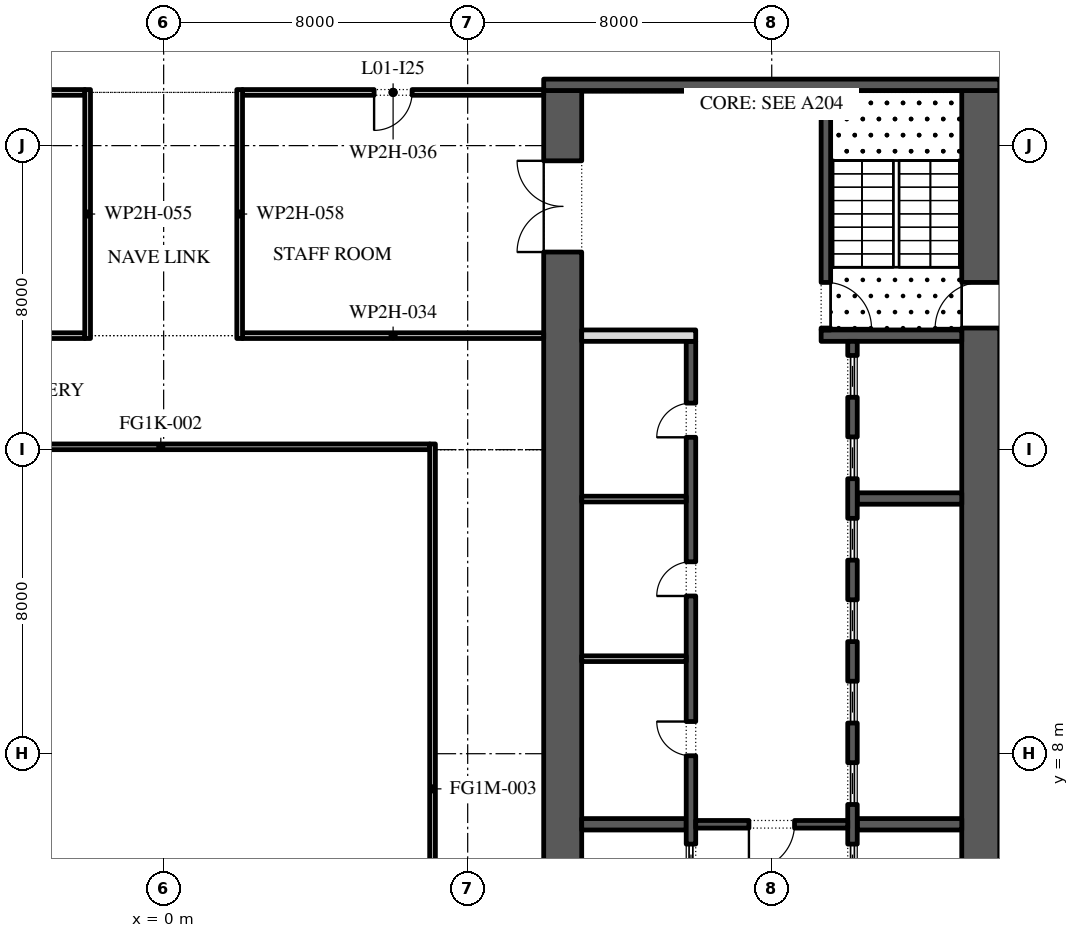
"""IFC4 building model, lengths in metres.
Left out: names, types, materials, properties, quantities, classifications, styles, units other than length and angle.
Written with IfcOpenShell. Run it as: python <this file> out.ifc"""

import sys

from ifc_helpers import new_model, si_unit, direction, frame, frame_2d, origin, place, context, subcontext, project, spatial, rectangle, extrude, element, fill, save


model = new_model("IFC4")
c1 = context("Model", 3, precision=1e-05, world=origin(), true_north=direction((0.0, 1.0)))
c2 = subcontext(c1, "Body", "Model", "MODEL_VIEW")
j1 = project(units=[si_unit("LENGTHUNIT", "METRE"), si_unit("PLANEANGLEUNIT", "RADIAN")], contexts=[c1])
p1 = place(None, origin())
s1 = spatial("IfcSite", under=j1, at=p1, CompositionType="ELEMENT")
p2 = place(p1, origin())
s2 = spatial("IfcBuilding", under=s1, at=p2, CompositionType="ELEMENT")
p3 = place(p2, frame((0.0, 0.0, 8.0)))
s3 = spatial("IfcBuildingStorey", under=s2, at=p3, CompositionType="ELEMENT", Elevation=8.0)
p4 = place(p3, frame((-7.15, 16.075, 0.0), z_axis=(0.0, 0.0, 1.0), x_axis=(1.0, 0.0, 0.0)))
e1 = element("IfcWall", 1, at=p4, inside=s3, PredefinedType="STANDARD", context=c2, shape_type="SweptSolid", body=[
    extrude(rectangle(XDim=14.15, YDim=0.15, at=frame_2d((7.075, 0.0))), origin(), (0.0, 0.0, 1.0), 4.72),
])
p5 = place(p3, frame((7.075, 16.15, 0.0), z_axis=(0.0, 0.0, 1.0), x_axis=(0.0, -1.0, 0.0)))
e2 = element("IfcWall", 2, at=p5, inside=s3, PredefinedType="STANDARD", context=c2, shape_type="SweptSolid", body=[
    extrude(rectangle(XDim=18.15, YDim=0.15, at=frame_2d((9.075, 0.0))), origin(), (0.0, 0.0, 1.0), 5.7),
])
p6 = place(p3, frame((21.5, -2.45, 0.0), z_axis=(0.0, 0.0, 1.0), x_axis=(0.0, 1.0, 0.0)))
e3 = element("IfcWall", 3, at=p6, inside=s3, PredefinedType="SHEAR", context=c2, shape_type="SweptSolid", body=[
    extrude(rectangle(XDim=27.9, YDim=1.0, at=frame_2d((13.95, 0.0))), origin(), (0.0, 0.0, 1.0), 5.7),
])
p7 = place(p6, frame((5.05, 0.0, 0.0)))
e4 = element("IfcOpeningElement", 4, at=p7, cuts=e3, PredefinedType="OPENING", context=c2, shape_type="SweptSolid", body=[
    extrude(rectangle(XDim=1.2, YDim=2.1, at=frame_2d((0.6, 1.05))), frame((0.0, 0.51, 0.0), z_axis=(0.0, -1.0, 0.0), x_axis=(1.0, 0.0, 0.0)), (0.0, 0.0, 1.0), 1.02),
])
p8 = place(p6, frame((21.65, 0.0, 0.0)))
e5 = element("IfcOpeningElement", 5, at=p8, cuts=e3, PredefinedType="OPENING", context=c2, shape_type="SweptSolid", body=[
    extrude(rectangle(XDim=1.2, YDim=2.1, at=frame_2d((0.6, 1.05))), frame((0.0, 0.51, 0.0), z_axis=(0.0, -1.0, 0.0), x_axis=(1.0, 0.0, 0.0)), (0.0, 0.0, 1.0), 1.02),
])
p9 = place(p3, frame((10.5, -2.45, 0.0), z_axis=(0.0, 0.0, 1.0), x_axis=(0.0, 1.0, 0.0)))
e6 = element("IfcWall", 6, at=p9, inside=s3, PredefinedType="SHEAR", context=c2, shape_type="SweptSolid", body=[
    extrude(rectangle(XDim=27.9, YDim=1.0, at=frame_2d((13.95, 0.0))), origin(), (0.0, 0.0, 1.0), 5.7),
])
p10 = place(p9, frame((23.65, 0.0, 0.0)))
e7 = element("IfcOpeningElement", 7, at=p10, cuts=e6, PredefinedType="OPENING", context=c2, shape_type="SweptSolid", body=[
    extrude(rectangle(XDim=2.4, YDim=2.1, at=frame_2d((1.2, 1.05))), frame((0.0, 0.51, 0.0), z_axis=(0.0, -1.0, 0.0), x_axis=(1.0, 0.0, 0.0)), (0.0, 0.0, 1.0), 1.02),
])
p11 = place(p9, frame((0.788, 0.0, 0.0)))
e8 = element("IfcOpeningElement", 8, at=p11, cuts=e6, PredefinedType="OPENING", context=c2, shape_type="SweptSolid", body=[
    extrude(rectangle(XDim=0.9, YDim=2.1, at=frame_2d((0.45, 1.05))), frame((0.0, 0.51, 0.0), z_axis=(0.0, -1.0, 0.0), x_axis=(1.0, 0.0, 0.0)), (0.0, 0.0, 1.0), 1.02),
])
p12 = place(p9, frame((4.012, 0.0, 0.0)))
e9 = element("IfcOpeningElement", 9, at=p12, cuts=e6, PredefinedType="OPENING", context=c2, shape_type="SweptSolid", body=[
    extrude(rectangle(XDim=0.9, YDim=2.1, at=frame_2d((0.45, 1.05))), frame((0.0, 0.51, 0.0), z_axis=(0.0, -1.0, 0.0), x_axis=(1.0, 0.0, 0.0)), (0.0, 0.0, 1.0), 1.02),
])
p13 = place(p3, frame((10.0, 25.6, 0.0), z_axis=(0.0, 0.0, 1.0), x_axis=(1.0, 0.0, 0.0)))
e10 = element("IfcWall", 10, at=p13, inside=s3, PredefinedType="SHEAR", context=c2, shape_type="SweptSolid", body=[
    extrude(rectangle(XDim=12.0, YDim=0.3, at=frame_2d((6.0, 0.0))), origin(), (0.0, 0.0, 1.0), 5.7),
])
p14 = place(p3, frame((17.3, 19.0, 0.0), z_axis=(0.0, 0.0, 1.0), x_axis=(1.0, 0.0, 0.0)))
e11 = element("IfcWall", 11, at=p14, inside=s3, PredefinedType="SHEAR", context=c2, shape_type="SweptSolid", body=[
    extrude(rectangle(XDim=3.7, YDim=0.3, at=frame_2d((1.85, 0.0))), origin(), (0.0, 0.0, 1.0), 5.7),
])
p15 = place(p3, frame((17.425, 19.15, 0.0), z_axis=(0.0, 0.0, 1.0), x_axis=(0.0, 1.0, 0.0)))
e12 = element("IfcWall", 12, at=p15, inside=s3, PredefinedType="SHEAR", context=c2, shape_type="SweptSolid", body=[
    extrude(rectangle(XDim=6.3, YDim=0.25, at=frame_2d((3.15, 0.0))), origin(), (0.0, 0.0, 1.0), 5.7),
])
p16 = place(p15, frame((0.05, 0.0, 0.0)))
e13 = element("IfcOpeningElement", 13, at=p16, cuts=e12, PredefinedType="OPENING", context=c2, shape_type="SweptSolid", body=[
    extrude(rectangle(XDim=1.2, YDim=2.1, at=frame_2d((0.6, 1.05))), frame((0.0, 0.135, 0.0), z_axis=(0.0, -1.0, 0.0), x_axis=(1.0, 0.0, 0.0)), (0.0, 0.0, 1.0), 0.27),
])
for number, where, z_axis, x_axis in (
    (14, (18.25, 6.143, 0.0), (0.0, 0.0, 1.0), (1.0, 0.0, 0.0)),
    (15, (18.25, 14.714, 0.0), (0.0, 0.0, 1.0), (1.0, 0.0, 0.0)),
):
    element("IfcWall", number, at=place(p3, frame(where, z_axis=z_axis, x_axis=x_axis)), inside=s3, PredefinedType="SHEAR", context=c2, shape_type="SweptSolid", body=[
        extrude(rectangle(XDim=2.75, YDim=0.3, at=frame_2d((1.375, 0.0))), origin(), (0.0, 0.0, 1.0), 5.7),
    ])
p17 = place(p3, frame((18.125, 4.15, 0.0), z_axis=(0.0, 0.0, 1.0), x_axis=(0.0, 1.0, 0.0)))
e16 = element("IfcWall", 16, at=p17, inside=s3, PredefinedType="SHEAR", context=c2, shape_type="SweptSolid", body=[
    extrude(rectangle(XDim=14.7, YDim=0.25, at=frame_2d((7.35, 0.0))), origin(), (0.0, 0.0, 1.0), 5.7),
])
p18 = place(p17, frame((0.371, 0.0, 0.0)))
e17 = element("IfcOpeningElement", 17, at=p18, cuts=e16, PredefinedType="OPENING", context=c2, shape_type="SweptSolid", body=[
    extrude(rectangle(XDim=1.1, YDim=2.1, at=frame_2d((0.55, 1.05))), frame((0.0, 0.135, 0.0), z_axis=(0.0, -1.0, 0.0), x_axis=(1.0, 0.0, 0.0)), (0.0, 0.0, 1.0), 0.27),
])
p19 = place(p17, frame((2.514, 0.0, 0.0)))
e18 = element("IfcOpeningElement", 18, at=p19, cuts=e16, PredefinedType="OPENING", context=c2, shape_type="SweptSolid", body=[
    extrude(rectangle(XDim=1.1, YDim=2.1, at=frame_2d((0.55, 1.05))), frame((0.0, 0.135, 0.0), z_axis=(0.0, -1.0, 0.0), x_axis=(1.0, 0.0, 0.0)), (0.0, 0.0, 1.0), 0.27),
])
p20 = place(p17, frame((4.657, 0.0, 0.0)))
e19 = element("IfcOpeningElement", 19, at=p20, cuts=e16, PredefinedType="OPENING", context=c2, shape_type="SweptSolid", body=[
    extrude(rectangle(XDim=1.1, YDim=2.1, at=frame_2d((0.55, 1.05))), frame((0.0, 0.135, 0.0), z_axis=(0.0, -1.0, 0.0), x_axis=(1.0, 0.0, 0.0)), (0.0, 0.0, 1.0), 0.27),
])
p21 = place(p17, frame((6.8, 0.0, 0.0)))
e20 = element("IfcOpeningElement", 20, at=p21, cuts=e16, PredefinedType="OPENING", context=c2, shape_type="SweptSolid", body=[
    extrude(rectangle(XDim=1.1, YDim=2.1, at=frame_2d((0.55, 1.05))), frame((0.0, 0.135, 0.0), z_axis=(0.0, -1.0, 0.0), x_axis=(1.0, 0.0, 0.0)), (0.0, 0.0, 1.0), 0.27),
])
p22 = place(p17, frame((8.943, 0.0, 0.0)))
e21 = element("IfcOpeningElement", 21, at=p22, cuts=e16, PredefinedType="OPENING", context=c2, shape_type="SweptSolid", body=[
    extrude(rectangle(XDim=1.1, YDim=2.1, at=frame_2d((0.55, 1.05))), frame((0.0, 0.135, 0.0), z_axis=(0.0, -1.0, 0.0), x_axis=(1.0, 0.0, 0.0)), (0.0, 0.0, 1.0), 0.27),
])
p23 = place(p17, frame((11.086, 0.0, 0.0)))
e22 = element("IfcOpeningElement", 22, at=p23, cuts=e16, PredefinedType="OPENING", context=c2, shape_type="SweptSolid", body=[
    extrude(rectangle(XDim=1.1, YDim=2.1, at=frame_2d((0.55, 1.05))), frame((0.0, 0.135, 0.0), z_axis=(0.0, -1.0, 0.0), x_axis=(1.0, 0.0, 0.0)), (0.0, 0.0, 1.0), 0.27),
])
p24 = place(p17, frame((13.229, 0.0, 0.0)))
e23 = element("IfcOpeningElement", 23, at=p24, cuts=e16, PredefinedType="OPENING", context=c2, shape_type="SweptSolid", body=[
    extrude(rectangle(XDim=1.1, YDim=2.1, at=frame_2d((0.55, 1.05))), frame((0.0, 0.135, 0.0), z_axis=(0.0, -1.0, 0.0), x_axis=(1.0, 0.0, 0.0)), (0.0, 0.0, 1.0), 0.27),
])
p25 = place(p3, frame((11.0, 6.143, 0.0), z_axis=(0.0, 0.0, 1.0), x_axis=(1.0, 0.0, 0.0)))
e24 = element("IfcWall", 24, at=p25, inside=s3, PredefinedType="SHEAR", context=c2, shape_type="SweptSolid", body=[
    extrude(rectangle(XDim=2.75, YDim=0.3, at=frame_2d((1.375, 0.0))), origin(), (0.0, 0.0, 1.0), 5.7),
])
p26 = place(p3, frame((13.875, -2.45, 0.0), z_axis=(0.0, 0.0, 1.0), x_axis=(0.0, 1.0, 0.0)))
e25 = element("IfcWall", 25, at=p26, inside=s3, PredefinedType="SHEAR", context=c2, shape_type="SweptSolid", body=[
    extrude(rectangle(XDim=21.3, YDim=0.25, at=frame_2d((10.65, 0.0))), origin(), (0.0, 0.0, 1.0), 5.7),
])
p27 = place(p26, frame((10.396, 0.0, 0.0)))
e26 = element("IfcOpeningElement", 26, at=p27, cuts=e25, PredefinedType="OPENING", context=c2, shape_type="SweptSolid", body=[
    extrude(rectangle(XDim=0.9, YDim=2.1, at=frame_2d((0.45, 1.05))), frame((0.0, 0.135, 0.0), z_axis=(0.0, -1.0, 0.0), x_axis=(1.0, 0.0, 0.0)), (0.0, 0.0, 1.0), 0.27),
])
p28 = place(p26, frame((14.6, 0.0, 0.0)))
e27 = element("IfcOpeningElement", 27, at=p28, cuts=e25, PredefinedType="OPENING", context=c2, shape_type="SweptSolid", body=[
    extrude(rectangle(XDim=0.9, YDim=2.1, at=frame_2d((0.45, 1.05))), frame((0.0, 0.135, 0.0), z_axis=(0.0, -1.0, 0.0), x_axis=(1.0, 0.0, 0.0)), (0.0, 0.0, 1.0), 0.27),
])
p29 = place(p26, frame((18.775, 0.0, 0.0)))
e28 = element("IfcOpeningElement", 28, at=p29, cuts=e25, PredefinedType="OPENING", context=c2, shape_type="SweptSolid", body=[
    extrude(rectangle(XDim=0.9, YDim=2.1, at=frame_2d((0.45, 1.05))), frame((0.0, 0.135, 0.0), z_axis=(0.0, -1.0, 0.0), x_axis=(1.0, 0.0, 0.0)), (0.0, 0.0, 1.0), 0.27),
])
p30 = place(p26, frame((6.971, 0.0, 0.0)))
e29 = element("IfcOpeningElement", 29, at=p30, cuts=e25, PredefinedType="OPENING", context=c2, shape_type="SweptSolid", body=[
    extrude(rectangle(XDim=1.1, YDim=2.1, at=frame_2d((0.55, 1.05))), frame((0.0, 0.135, 0.0), z_axis=(0.0, -1.0, 0.0), x_axis=(1.0, 0.0, 0.0)), (0.0, 0.0, 1.0), 0.27),
])
p31 = place(p3, frame((11.0, 19.0, 0.0), z_axis=(0.0, 0.0, 1.0), x_axis=(1.0, 0.0, 0.0)))
e30 = element("IfcWall", 30, at=p31, inside=s3, PredefinedType="PARTITIONING", context=c2, shape_type="SweptSolid", body=[
    extrude(rectangle(XDim=3.0, YDim=0.3, at=frame_2d((1.5, 0.0))), origin(), (0.0, 0.0, 1.0), 5.7),
])
for number, where, z_axis, x_axis in (
    (31, (11.0, 10.5, 0.0), (0.0, 0.0, 1.0), (1.0, 0.0, 0.0)),
    (32, (11.0, 14.7, 0.0), (0.0, 0.0, 1.0), (1.0, 0.0, 0.0)),
):
    element("IfcWall", number, at=place(p3, frame(where, z_axis=z_axis, x_axis=x_axis)), inside=s3, PredefinedType="PARTITIONING", context=c2, shape_type="SweptSolid", body=[
        extrude(rectangle(XDim=2.75, YDim=0.15, at=frame_2d((1.375, 0.0))), origin(), (0.0, 0.0, 1.0), 5.7),
    ])
p32 = place(p3, frame((14.0, 6.143, 0.0), z_axis=(0.0, 0.0, 1.0), x_axis=(1.0, 0.0, 0.0)))
e33 = element("IfcWall", 33, at=p32, inside=s3, PredefinedType="SHEAR", context=c2, shape_type="SweptSolid", body=[
    extrude(rectangle(XDim=4.0, YDim=0.2, at=frame_2d((2.0, 0.0))), origin(), (0.0, 0.0, 1.0), 5.7),
])
p33 = place(p32, frame((1.4, 0.0, 0.0)))
e34 = element("IfcOpeningElement", 34, at=p33, cuts=e33, PredefinedType="OPENING", context=c2, shape_type="SweptSolid", body=[
    extrude(rectangle(XDim=1.2, YDim=2.1, at=frame_2d((0.6, 1.05))), frame((0.0, 0.11, 0.0), z_axis=(0.0, -1.0, 0.0), x_axis=(1.0, 0.0, 0.0)), (0.0, 0.0, 1.0), 0.22),
])
for number, where, z_axis, x_axis in (
    (35, (-10.0, 19.0, 0.0), (0.0, 0.0, 1.0), (1.0, 0.0, 0.0)),
    (36, (2.075, 19.0, 0.0), (0.0, 0.0, 1.0), (1.0, 0.0, 0.0)),
):
    element("IfcWall", number, at=place(p3, frame(where, z_axis=z_axis, x_axis=x_axis)), inside=s3, PredefinedType="PARTITIONING", context=c2, shape_type="SweptSolid", body=[
        extrude(rectangle(XDim=7.925, YDim=0.15, at=frame_2d((3.962, 0.0))), origin(), (0.0, 0.0, 1.0), 5.7),
    ])
p34 = place(p3, frame((-10.0, 25.4, 0.0), z_axis=(0.0, 0.0, 1.0), x_axis=(1.0, 0.0, 0.0)))
e37 = element("IfcWall", 37, at=p34, inside=s3, PredefinedType="PARTITIONING", context=c2, shape_type="SweptSolid", body=[
    extrude(rectangle(XDim=7.925, YDim=0.15, at=frame_2d((3.962, 0.0))), origin(), (0.0, 0.0, 1.0), 5.7),
])
p35 = place(p34, frame((3.462, 0.0, 0.0)))
e38 = element("IfcOpeningElement", 38, at=p35, cuts=e37, PredefinedType="OPENING", context=c2, shape_type="SweptSolid", body=[
    extrude(rectangle(XDim=1.0, YDim=2.1, at=frame_2d((0.5, 1.05))), frame((0.0, 0.085, 0.0), z_axis=(0.0, -1.0, 0.0), x_axis=(1.0, 0.0, 0.0)), (0.0, 0.0, 1.0), 0.17),
])
p36 = place(p3, frame((2.075, 25.4, 0.0), z_axis=(0.0, 0.0, 1.0), x_axis=(1.0, 0.0, 0.0)))
e39 = element("IfcWall", 39, at=p36, inside=s3, PredefinedType="PARTITIONING", context=c2, shape_type="SweptSolid", body=[
    extrude(rectangle(XDim=7.925, YDim=0.15, at=frame_2d((3.962, 0.0))), origin(), (0.0, 0.0, 1.0), 5.7),
])
p37 = place(p36, frame((3.462, 0.0, 0.0)))
e40 = element("IfcOpeningElement", 40, at=p37, cuts=e39, PredefinedType="OPENING", context=c2, shape_type="SweptSolid", body=[
    extrude(rectangle(XDim=1.0, YDim=2.1, at=frame_2d((0.5, 1.05))), frame((0.0, 0.085, 0.0), z_axis=(0.0, -1.0, 0.0), x_axis=(1.0, 0.0, 0.0)), (0.0, 0.0, 1.0), 0.17),
])
for number, where, z_axis, x_axis in (
    (41, (-2.0, 18.925, 0.0), (0.0, 0.0, 1.0), (0.0, 1.0, 0.0)),
    (42, (2.0, 18.925, 0.0), (0.0, 0.0, 1.0), (0.0, 1.0, 0.0)),
):
    element("IfcWall", number, at=place(p3, frame(where, z_axis=z_axis, x_axis=x_axis)), inside=s3, PredefinedType="PARTITIONING", context=c2, shape_type="SweptSolid", body=[
        extrude(rectangle(XDim=6.55, YDim=0.15, at=frame_2d((3.275, 0.0))), origin(), (0.0, 0.0, 1.0), 5.7),
    ])
p38 = place(p18, origin())
e43 = element("IfcDoor", 43, at=p38, inside=s3, OperationType="SLIDING_TO_LEFT", PredefinedType="DOOR", context=c2, shape_type="SweptSolid", body=[
    extrude(rectangle(XDim=1.1, YDim=2.1, at=frame_2d((0.55, 1.05))), frame((0.0, 0.025, 0.0), z_axis=(0.0, -1.0, 0.0), x_axis=(1.0, 0.0, 0.0)), (0.0, 0.0, 1.0), 0.05),
])
fill(e17, e43)
p39 = place(p19, origin())
e44 = element("IfcDoor", 44, at=p39, inside=s3, OperationType="SLIDING_TO_LEFT", PredefinedType="DOOR", context=c2, shape_type="SweptSolid", body=[
    extrude(rectangle(XDim=1.1, YDim=2.1, at=frame_2d((0.55, 1.05))), frame((0.0, 0.025, 0.0), z_axis=(0.0, -1.0, 0.0), x_axis=(1.0, 0.0, 0.0)), (0.0, 0.0, 1.0), 0.05),
])
fill(e18, e44)
p40 = place(p20, origin())
e45 = element("IfcDoor", 45, at=p40, inside=s3, OperationType="SLIDING_TO_LEFT", PredefinedType="DOOR", context=c2, shape_type="SweptSolid", body=[
    extrude(rectangle(XDim=1.1, YDim=2.1, at=frame_2d((0.55, 1.05))), frame((0.0, 0.025, 0.0), z_axis=(0.0, -1.0, 0.0), x_axis=(1.0, 0.0, 0.0)), (0.0, 0.0, 1.0), 0.05),
])
fill(e19, e45)
p41 = place(p21, origin())
e46 = element("IfcDoor", 46, at=p41, inside=s3, OperationType="SLIDING_TO_LEFT", PredefinedType="DOOR", context=c2, shape_type="SweptSolid", body=[
    extrude(rectangle(XDim=1.1, YDim=2.1, at=frame_2d((0.55, 1.05))), frame((0.0, 0.025, 0.0), z_axis=(0.0, -1.0, 0.0), x_axis=(1.0, 0.0, 0.0)), (0.0, 0.0, 1.0), 0.05),
])
fill(e20, e46)
p42 = place(p22, origin())
e47 = element("IfcDoor", 47, at=p42, inside=s3, OperationType="SLIDING_TO_LEFT", PredefinedType="DOOR", context=c2, shape_type="SweptSolid", body=[
    extrude(rectangle(XDim=1.1, YDim=2.1, at=frame_2d((0.55, 1.05))), frame((0.0, 0.025, 0.0), z_axis=(0.0, -1.0, 0.0), x_axis=(1.0, 0.0, 0.0)), (0.0, 0.0, 1.0), 0.05),
])
fill(e21, e47)
p43 = place(p23, origin())
e48 = element("IfcDoor", 48, at=p43, inside=s3, OperationType="SLIDING_TO_LEFT", PredefinedType="DOOR", context=c2, shape_type="SweptSolid", body=[
    extrude(rectangle(XDim=1.1, YDim=2.1, at=frame_2d((0.55, 1.05))), frame((0.0, 0.025, 0.0), z_axis=(0.0, -1.0, 0.0), x_axis=(1.0, 0.0, 0.0)), (0.0, 0.0, 1.0), 0.05),
])
fill(e22, e48)
p44 = place(p24, origin())
e49 = element("IfcDoor", 49, at=p44, inside=s3, OperationType="SLIDING_TO_LEFT", PredefinedType="DOOR", context=c2, shape_type="SweptSolid", body=[
    extrude(rectangle(XDim=1.1, YDim=2.1, at=frame_2d((0.55, 1.05))), frame((0.0, 0.025, 0.0), z_axis=(0.0, -1.0, 0.0), x_axis=(1.0, 0.0, 0.0)), (0.0, 0.0, 1.0), 0.05),
])
fill(e23, e49)
p45 = place(p27, origin())
e50 = element("IfcDoor", 50, at=p45, inside=s3, OperationType="SINGLE_SWING_LEFT", PredefinedType="DOOR", context=c2, shape_type="SweptSolid", body=[
    extrude(rectangle(XDim=0.9, YDim=2.1, at=frame_2d((0.45, 1.05))), frame((0.0, 0.125, 0.0), z_axis=(0.0, -1.0, 0.0), x_axis=(1.0, 0.0, 0.0)), (0.0, 0.0, 1.0), 0.05),
])
fill(e26, e50)
p46 = place(p28, origin())
e51 = element("IfcDoor", 51, at=p46, inside=s3, OperationType="SINGLE_SWING_RIGHT", PredefinedType="DOOR", context=c2, shape_type="SweptSolid", body=[
    extrude(rectangle(XDim=0.9, YDim=2.1, at=frame_2d((0.45, 1.05))), frame((0.0, 0.125, 0.0), z_axis=(0.0, -1.0, 0.0), x_axis=(1.0, 0.0, 0.0)), (0.0, 0.0, 1.0), 0.05),
])
fill(e27, e51)
p47 = place(p29, origin())
e52 = element("IfcDoor", 52, at=p47, inside=s3, OperationType="SINGLE_SWING_RIGHT", PredefinedType="DOOR", context=c2, shape_type="SweptSolid", body=[
    extrude(rectangle(XDim=0.9, YDim=2.1, at=frame_2d((0.45, 1.05))), frame((0.0, 0.125, 0.0), z_axis=(0.0, -1.0, 0.0), x_axis=(1.0, 0.0, 0.0)), (0.0, 0.0, 1.0), 0.05),
])
fill(e28, e52)
p48 = place(p30, origin())
e53 = element("IfcDoor", 53, at=p48, inside=s3, OperationType="SLIDING_TO_LEFT", PredefinedType="DOOR", context=c2, shape_type="SweptSolid", body=[
    extrude(rectangle(XDim=1.1, YDim=2.1, at=frame_2d((0.55, 1.05))), frame((0.0, 0.025, 0.0), z_axis=(0.0, -1.0, 0.0), x_axis=(1.0, 0.0, 0.0)), (0.0, 0.0, 1.0), 0.05),
])
fill(e29, e53)
p49 = place(p33, frame((1.2, 0.0, 0.0), z_axis=(0.0, 0.0, 1.0), x_axis=(-1.0, 0.0, 0.0)))
e54 = element("IfcDoor", 54, at=p49, inside=s3, OperationType="SINGLE_SWING_LEFT", PredefinedType="DOOR", context=c2, shape_type="SweptSolid", body=[
    extrude(rectangle(XDim=1.2, YDim=2.1, at=frame_2d((0.6, 1.05))), frame((0.0, 0.025, 0.0), z_axis=(0.0, -1.0, 0.0), x_axis=(1.0, 0.0, 0.0)), (0.0, 0.0, 1.0), 0.05),
])
fill(e34, e54)
p50 = place(p10, origin())
e55 = element("IfcDoor", 55, at=p50, inside=s3, OperationType="DOUBLE_DOOR_SINGLE_SWING", PredefinedType="DOOR", context=c2, shape_type="SweptSolid", body=[
    extrude(rectangle(XDim=2.4, YDim=2.1, at=frame_2d((1.2, 1.05))), frame((0.0, 0.025, 0.0), z_axis=(0.0, -1.0, 0.0), x_axis=(1.0, 0.0, 0.0)), (0.0, 0.0, 1.0), 0.05),
])
fill(e7, e55)
p51 = place(p16, frame((1.2, 0.0, 0.0), z_axis=(0.0, 0.0, 1.0), x_axis=(-1.0, 0.0, 0.0)))
e56 = element("IfcDoor", 56, at=p51, inside=s3, OperationType="SINGLE_SWING_LEFT", PredefinedType="DOOR", context=c2, shape_type="SweptSolid", body=[
    extrude(rectangle(XDim=1.2, YDim=2.1, at=frame_2d((0.6, 1.05))), frame((0.0, 0.025, 0.0), z_axis=(0.0, -1.0, 0.0), x_axis=(1.0, 0.0, 0.0)), (0.0, 0.0, 1.0), 0.05),
])
fill(e13, e56)
p52 = place(p8, origin())
e57 = element("IfcDoor", 57, at=p52, inside=s3, OperationType="SINGLE_SWING_RIGHT", PredefinedType="DOOR", context=c2, shape_type="SweptSolid", body=[
    extrude(rectangle(XDim=1.2, YDim=2.1, at=frame_2d((0.6, 1.05))), frame((0.0, 0.025, 0.0), z_axis=(0.0, -1.0, 0.0), x_axis=(1.0, 0.0, 0.0)), (0.0, 0.0, 1.0), 0.05),
])
fill(e5, e57)
p53 = place(p37, frame((1.0, 0.0, 0.0), z_axis=(0.0, 0.0, 1.0), x_axis=(-1.0, 0.0, 0.0)))
e58 = element("IfcDoor", 58, at=p53, inside=s3, OperationType="SINGLE_SWING_LEFT", PredefinedType="DOOR", context=c2, shape_type="SweptSolid", body=[
    extrude(rectangle(XDim=1.0, YDim=2.1, at=frame_2d((0.5, 1.05))), frame((0.0, 0.025, 0.0), z_axis=(0.0, -1.0, 0.0), x_axis=(1.0, 0.0, 0.0)), (0.0, 0.0, 1.0), 0.05),
])
fill(e40, e58)
save(model, sys.argv[1])
